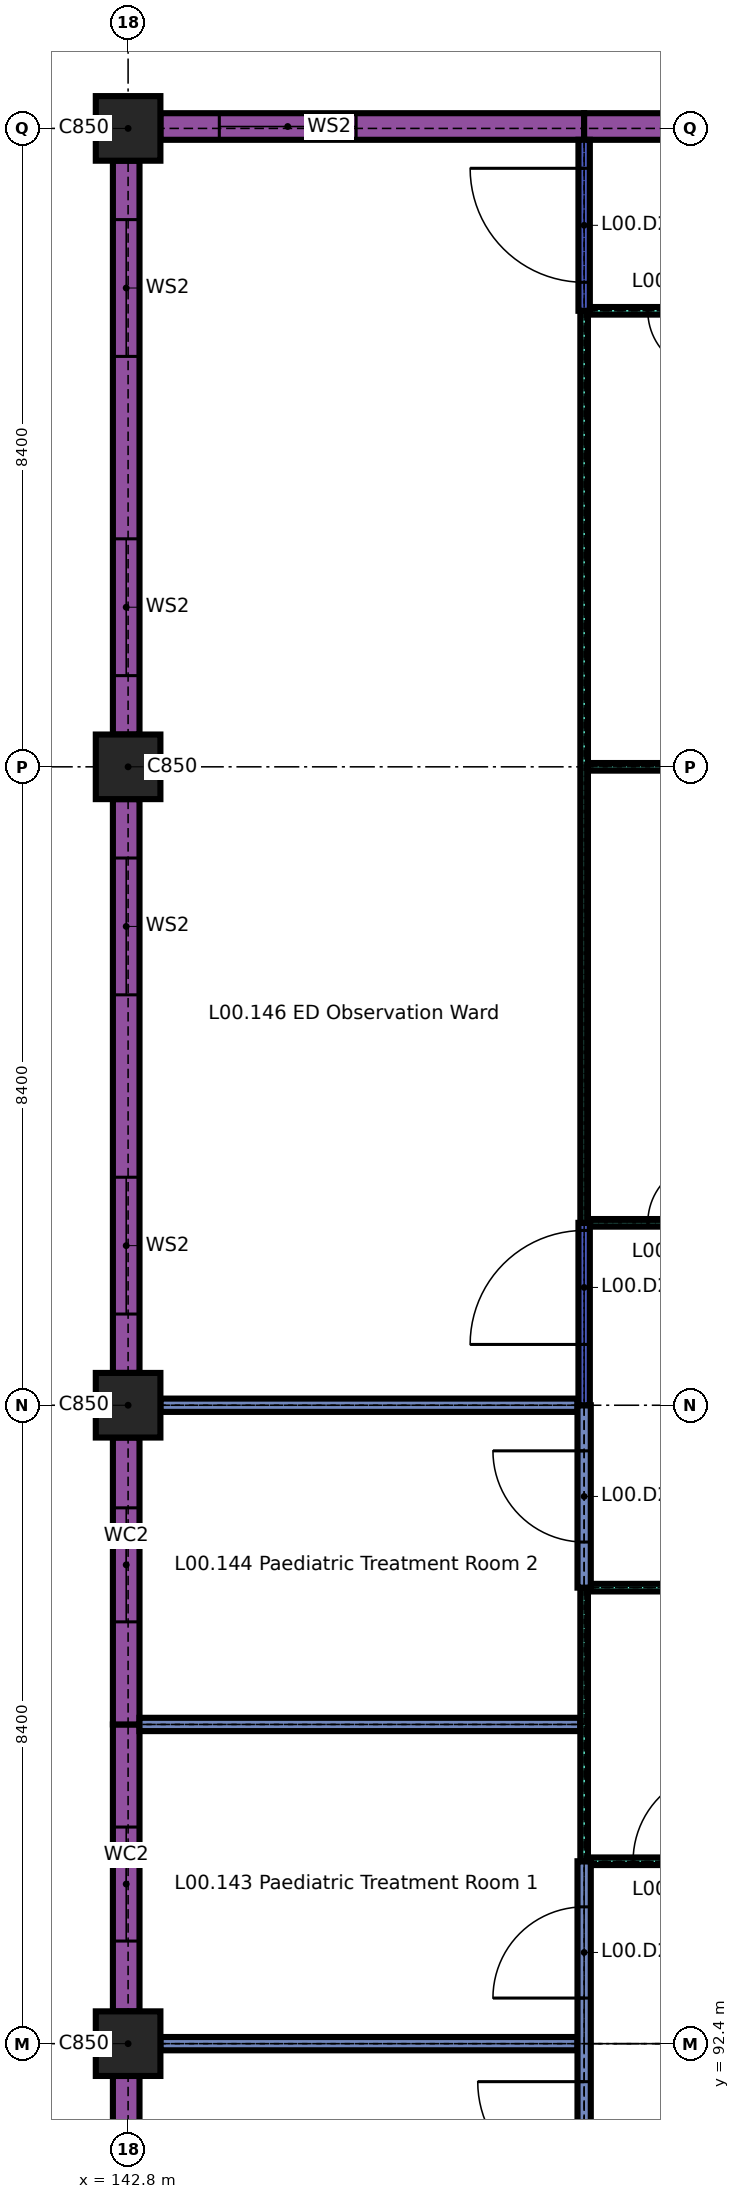
"""IFC4 building model, lengths in metres.
Left out: names, types, materials, properties, quantities, classifications, styles, units other than length and angle.
Written with IfcOpenShell. Run it as: python <this file> out.ifc"""

import sys

from ifc_helpers import new_model, si_unit, direction, frame, frame_2d, origin, origin_2d, place, context, subcontext, project, spatial, rectangle, extrude, element, fill, save


model = new_model("IFC4")
c1 = context("Model", 3, precision=1e-05, world=origin(), true_north=direction((0.0, 1.0)))
c2 = subcontext(c1, "Body", "Model", "MODEL_VIEW")
j1 = project(units=[si_unit("LENGTHUNIT", "METRE"), si_unit("PLANEANGLEUNIT", "RADIAN")], contexts=[c1])
p1 = place(None, origin())
s1 = spatial("IfcSite", under=j1, at=p1, CompositionType="ELEMENT")
p2 = place(p1, origin())
s2 = spatial("IfcBuilding", under=s1, at=p2, CompositionType="ELEMENT")
p3 = place(p2, origin())
s3 = spatial("IfcBuildingStorey", under=s2, at=p3, CompositionType="ELEMENT", Elevation=0.0)
for number, where, z_axis, x_axis in (
    (1, (142.8, 92.4, 0.0), (0.0, 0.0, 1.0), (1.0, 0.0, 0.0)),
    (2, (142.8, 100.8, 0.0), (0.0, 0.0, 1.0), (1.0, 0.0, 0.0)),
    (3, (142.8, 109.2, 0.0), (0.0, 0.0, 1.0), (1.0, 0.0, 0.0)),
    (4, (142.8, 117.6, 0.0), (0.0, 0.0, 1.0), (1.0, 0.0, 0.0)),
):
    element("IfcColumn", number, at=place(p3, frame(where, z_axis=z_axis, x_axis=x_axis)), inside=s3, PredefinedType="COLUMN", context=c2, shape_type="SweptSolid", body=[
        extrude(rectangle(XDim=0.85, YDim=0.85, at=origin_2d()), origin(), (0.0, 0.0, 1.0), 4.14),
    ])
p4 = place(p3, frame((143.225, 117.625, 0.0), z_axis=(0.0, 0.0, 1.0), x_axis=(1.0, 0.0, 0.0)))
e5 = element("IfcWall", 5, at=p4, inside=s3, PredefinedType="SOLIDWALL", context=c2, shape_type="SweptSolid", body=[
    extrude(rectangle(XDim=5.575, YDim=0.35, at=frame_2d((2.788, 0.0))), origin(), (0.0, 0.0, 1.0), 3.84),
])
p5 = place(p4, frame((0.775, 0.0, 0.9)))
e6 = element("IfcOpeningElement", 6, at=p5, cuts=e5, PredefinedType="OPENING", context=c2, shape_type="SweptSolid", body=[
    extrude(rectangle(XDim=1.8, YDim=2.1, at=frame_2d((0.9, 1.05))), frame((0.0, 0.185, 0.0), z_axis=(0.0, -1.0, 0.0), x_axis=(1.0, 0.0, 0.0)), (0.0, 0.0, 1.0), 0.37),
])
p6 = place(p3, frame((148.8, 117.625, 0.0), z_axis=(0.0, 0.0, 1.0), x_axis=(1.0, 0.0, 0.0)))
e7 = element("IfcWall", 7, at=p6, inside=s3, PredefinedType="SOLIDWALL", context=c2, shape_type="SweptSolid", body=[
    extrude(rectangle(XDim=1.975, YDim=0.35, at=frame_2d((0.987, 0.0))), origin(), (0.0, 0.0, 1.0), 3.84),
])
p7 = place(p3, frame((142.775, 88.2, 0.0), z_axis=(0.0, 0.0, 1.0), x_axis=(0.0, 1.0, 0.0)))
e8 = element("IfcWall", 8, at=p7, inside=s3, PredefinedType="SOLIDWALL", context=c2, shape_type="SweptSolid", body=[
    extrude(rectangle(XDim=3.775, YDim=0.35, at=frame_2d((1.888, 0.0))), origin(), (0.0, 0.0, 1.0), 3.84),
])
p8 = place(p7, frame((1.2, 0.0, 0.9)))
e9 = element("IfcOpeningElement", 9, at=p8, cuts=e8, PredefinedType="OPENING", context=c2, shape_type="SweptSolid", body=[
    extrude(rectangle(XDim=1.8, YDim=2.1, at=frame_2d((0.9, 1.05))), frame((0.0, 0.185, 0.0), z_axis=(0.0, -1.0, 0.0), x_axis=(1.0, 0.0, 0.0)), (0.0, 0.0, 1.0), 0.37),
])
p9 = place(p3, frame((142.775, 92.825, 0.0), z_axis=(0.0, 0.0, 1.0), x_axis=(0.0, 1.0, 0.0)))
e10 = element("IfcWall", 10, at=p9, inside=s3, PredefinedType="SOLIDWALL", context=c2, shape_type="SweptSolid", body=[
    extrude(rectangle(XDim=3.775, YDim=0.35, at=frame_2d((1.888, 0.0))), origin(), (0.0, 0.0, 1.0), 3.84),
])
p10 = place(p9, frame((0.925, 0.0, 0.9)))
e11 = element("IfcOpeningElement", 11, at=p10, cuts=e10, PredefinedType="OPENING", context=c2, shape_type="SweptSolid", body=[
    extrude(rectangle(XDim=1.5, YDim=2.1, at=frame_2d((0.75, 1.05))), frame((0.0, 0.185, 0.0), z_axis=(0.0, -1.0, 0.0), x_axis=(1.0, 0.0, 0.0)), (0.0, 0.0, 1.0), 0.37),
])
p11 = place(p3, frame((142.775, 96.6, 0.0), z_axis=(0.0, 0.0, 1.0), x_axis=(0.0, 1.0, 0.0)))
e12 = element("IfcWall", 12, at=p11, inside=s3, PredefinedType="SOLIDWALL", context=c2, shape_type="SweptSolid", body=[
    extrude(rectangle(XDim=3.775, YDim=0.35, at=frame_2d((1.887, 0.0))), origin(), (0.0, 0.0, 1.0), 3.84),
])
p12 = place(p11, frame((1.35, 0.0, 0.9)))
e13 = element("IfcOpeningElement", 13, at=p12, cuts=e12, PredefinedType="OPENING", context=c2, shape_type="SweptSolid", body=[
    extrude(rectangle(XDim=1.5, YDim=2.1, at=frame_2d((0.75, 1.05))), frame((0.0, 0.185, 0.0), z_axis=(0.0, -1.0, 0.0), x_axis=(1.0, 0.0, 0.0)), (0.0, 0.0, 1.0), 0.37),
])
p13 = place(p3, frame((142.775, 101.225, 0.0), z_axis=(0.0, 0.0, 1.0), x_axis=(0.0, 1.0, 0.0)))
e14 = element("IfcWall", 14, at=p13, inside=s3, PredefinedType="SOLIDWALL", context=c2, shape_type="SweptSolid", body=[
    extrude(rectangle(XDim=7.55, YDim=0.35, at=frame_2d((3.775, 0.0))), origin(), (0.0, 0.0, 1.0), 3.84),
])
p14 = place(p13, frame((0.775, 0.0, 0.9)))
e15 = element("IfcOpeningElement", 15, at=p14, cuts=e14, PredefinedType="OPENING", context=c2, shape_type="SweptSolid", body=[
    extrude(rectangle(XDim=1.8, YDim=2.1, at=frame_2d((0.9, 1.05))), frame((0.0, 0.185, 0.0), z_axis=(0.0, -1.0, 0.0), x_axis=(1.0, 0.0, 0.0)), (0.0, 0.0, 1.0), 0.37),
])
p15 = place(p13, frame((4.975, 0.0, 0.9)))
e16 = element("IfcOpeningElement", 16, at=p15, cuts=e14, PredefinedType="OPENING", context=c2, shape_type="SweptSolid", body=[
    extrude(rectangle(XDim=1.8, YDim=2.1, at=frame_2d((0.9, 1.05))), frame((0.0, 0.185, 0.0), z_axis=(0.0, -1.0, 0.0), x_axis=(1.0, 0.0, 0.0)), (0.0, 0.0, 1.0), 0.37),
])
p16 = place(p3, frame((142.775, 109.625, 0.0), z_axis=(0.0, 0.0, 1.0), x_axis=(0.0, 1.0, 0.0)))
e17 = element("IfcWall", 17, at=p16, inside=s3, PredefinedType="SOLIDWALL", context=c2, shape_type="SweptSolid", body=[
    extrude(rectangle(XDim=7.55, YDim=0.35, at=frame_2d((3.775, 0.0))), origin(), (0.0, 0.0, 1.0), 3.84),
])
p17 = place(p16, frame((0.775, 0.0, 0.9)))
e18 = element("IfcOpeningElement", 18, at=p17, cuts=e17, PredefinedType="OPENING", context=c2, shape_type="SweptSolid", body=[
    extrude(rectangle(XDim=1.8, YDim=2.1, at=frame_2d((0.9, 1.05))), frame((0.0, 0.185, 0.0), z_axis=(0.0, -1.0, 0.0), x_axis=(1.0, 0.0, 0.0)), (0.0, 0.0, 1.0), 0.37),
])
p18 = place(p16, frame((4.975, 0.0, 0.9)))
e19 = element("IfcOpeningElement", 19, at=p18, cuts=e17, PredefinedType="OPENING", context=c2, shape_type="SweptSolid", body=[
    extrude(rectangle(XDim=1.8, YDim=2.1, at=frame_2d((0.9, 1.05))), frame((0.0, 0.185, 0.0), z_axis=(0.0, -1.0, 0.0), x_axis=(1.0, 0.0, 0.0)), (0.0, 0.0, 1.0), 0.37),
])
p19 = place(p3, frame((143.225, 92.4, 0.0), z_axis=(0.0, 0.0, 1.0), x_axis=(1.0, 0.0, 0.0)))
e20 = element("IfcWall", 20, at=p19, inside=s3, PredefinedType="PARTITIONING", context=c2, shape_type="SweptSolid", body=[
    extrude(rectangle(XDim=5.487, YDim=0.175, at=frame_2d((2.744, 0.0))), origin(), (0.0, 0.0, 1.0), 4.14),
])
p20 = place(p3, frame((148.887, 94.8, 0.0), z_axis=(0.0, 0.0, 1.0), x_axis=(1.0, 0.0, 0.0)))
e21 = element("IfcWall", 21, at=p20, inside=s3, PredefinedType="PARTITIONING", context=c2, shape_type="SweptSolid", body=[
    extrude(rectangle(XDim=2.363, YDim=0.1, at=frame_2d((1.181, 0.0))), origin(), (0.0, 0.0, 1.0), 4.14),
])
p21 = place(p20, frame((0.556, 0.0, 0.0)))
e22 = element("IfcOpeningElement", 22, at=p21, cuts=e21, PredefinedType="OPENING", context=c2, shape_type="SweptSolid", body=[
    extrude(rectangle(XDim=1.2, YDim=2.1, at=frame_2d((0.6, 1.05))), frame((0.0, 0.06, 0.0), z_axis=(0.0, -1.0, 0.0), x_axis=(1.0, 0.0, 0.0)), (0.0, 0.0, 1.0), 0.12),
])
p22 = place(p3, frame((142.95, 96.6, 0.0), z_axis=(0.0, 0.0, 1.0), x_axis=(1.0, 0.0, 0.0)))
e23 = element("IfcWall", 23, at=p22, inside=s3, PredefinedType="PARTITIONING", context=c2, shape_type="SweptSolid", body=[
    extrude(rectangle(XDim=5.8, YDim=0.175, at=frame_2d((2.9, 0.0))), origin(), (0.0, 0.0, 1.0), 4.14),
])
p23 = place(p3, frame((148.887, 98.4, 0.0), z_axis=(0.0, 0.0, 1.0), x_axis=(1.0, 0.0, 0.0)))
e24 = element("IfcWall", 24, at=p23, inside=s3, PredefinedType="PARTITIONING", context=c2, shape_type="SweptSolid", body=[
    extrude(rectangle(XDim=2.363, YDim=0.1, at=frame_2d((1.181, 0.0))), origin(), (0.0, 0.0, 1.0), 4.14),
])
p24 = place(p3, frame((143.225, 100.8, 0.0), z_axis=(0.0, 0.0, 1.0), x_axis=(1.0, 0.0, 0.0)))
e25 = element("IfcWall", 25, at=p24, inside=s3, PredefinedType="PARTITIONING", context=c2, shape_type="SweptSolid", body=[
    extrude(rectangle(XDim=5.487, YDim=0.175, at=frame_2d((2.744, 0.0))), origin(), (0.0, 0.0, 1.0), 4.14),
])
p25 = place(p3, frame((148.875, 103.2, 0.0), z_axis=(0.0, 0.0, 1.0), x_axis=(1.0, 0.0, 0.0)))
e26 = element("IfcWall", 26, at=p25, inside=s3, PredefinedType="PARTITIONING", context=c2, shape_type="SweptSolid", body=[
    extrude(rectangle(XDim=2.375, YDim=0.1, at=frame_2d((1.188, 0.0))), origin(), (0.0, 0.0, 1.0), 4.14),
])
p26 = place(p25, frame((0.762, 0.0, 0.0)))
e27 = element("IfcOpeningElement", 27, at=p26, cuts=e26, PredefinedType="OPENING", context=c2, shape_type="SweptSolid", body=[
    extrude(rectangle(XDim=0.8, YDim=2.1, at=frame_2d((0.4, 1.05))), frame((0.0, 0.06, 0.0), z_axis=(0.0, -1.0, 0.0), x_axis=(1.0, 0.0, 0.0)), (0.0, 0.0, 1.0), 0.12),
])
p27 = place(p3, frame((148.85, 109.2, 0.0), z_axis=(0.0, 0.0, 1.0), x_axis=(1.0, 0.0, 0.0)))
e28 = element("IfcWall", 28, at=p27, inside=s3, PredefinedType="PARTITIONING", context=c2, shape_type="SweptSolid", body=[
    extrude(rectangle(XDim=1.925, YDim=0.1, at=frame_2d((0.962, 0.0))), origin(), (0.0, 0.0, 1.0), 4.14),
])
p28 = place(p3, frame((148.875, 115.2, 0.0), z_axis=(0.0, 0.0, 1.0), x_axis=(1.0, 0.0, 0.0)))
e29 = element("IfcWall", 29, at=p28, inside=s3, PredefinedType="PARTITIONING", context=c2, shape_type="SweptSolid", body=[
    extrude(rectangle(XDim=2.375, YDim=0.1, at=frame_2d((1.188, 0.0))), origin(), (0.0, 0.0, 1.0), 4.14),
])
p29 = place(p28, frame((0.762, 0.0, 0.0)))
e30 = element("IfcOpeningElement", 30, at=p29, cuts=e29, PredefinedType="OPENING", context=c2, shape_type="SweptSolid", body=[
    extrude(rectangle(XDim=0.8, YDim=2.1, at=frame_2d((0.4, 1.05))), frame((0.0, 0.06, 0.0), z_axis=(0.0, -1.0, 0.0), x_axis=(1.0, 0.0, 0.0)), (0.0, 0.0, 1.0), 0.12),
])
p30 = place(p3, frame((148.8, 90.0, 0.0), z_axis=(0.0, 0.0, 1.0), x_axis=(0.0, 1.0, 0.0)))
e31 = element("IfcWall", 31, at=p30, inside=s3, PredefinedType="PARTITIONING", context=c2, shape_type="SweptSolid", body=[
    extrude(rectangle(XDim=4.8, YDim=0.175, at=frame_2d((2.4, 0.0))), origin(), (0.0, 0.0, 1.0), 4.14),
])
p31 = place(p30, frame((0.5, 0.0, 0.0)))
e32 = element("IfcOpeningElement", 32, at=p31, cuts=e31, PredefinedType="OPENING", context=c2, shape_type="SweptSolid", body=[
    extrude(rectangle(XDim=1.4, YDim=2.1, at=frame_2d((0.7, 1.05))), frame((0.0, 0.097, 0.0), z_axis=(0.0, -1.0, 0.0), x_axis=(1.0, 0.0, 0.0)), (0.0, 0.0, 1.0), 0.195),
])
p32 = place(p30, frame((3.0, 0.0, 0.0)))
e33 = element("IfcOpeningElement", 33, at=p32, cuts=e31, PredefinedType="OPENING", context=c2, shape_type="SweptSolid", body=[
    extrude(rectangle(XDim=1.2, YDim=2.1, at=frame_2d((0.6, 1.05))), frame((0.0, 0.097, 0.0), z_axis=(0.0, -1.0, 0.0), x_axis=(1.0, 0.0, 0.0)), (0.0, 0.0, 1.0), 0.195),
])
p33 = place(p3, frame((148.8, 94.8, 0.0), z_axis=(0.0, 0.0, 1.0), x_axis=(0.0, 1.0, 0.0)))
e34 = element("IfcWall", 34, at=p33, inside=s3, PredefinedType="PARTITIONING", context=c2, shape_type="SweptSolid", body=[
    extrude(rectangle(XDim=3.6, YDim=0.1, at=frame_2d((1.8, 0.0))), origin(), (0.0, 0.0, 1.0), 4.14),
])
p34 = place(p3, frame((148.8, 98.4, 0.0), z_axis=(0.0, 0.0, 1.0), x_axis=(0.0, 1.0, 0.0)))
e35 = element("IfcWall", 35, at=p34, inside=s3, PredefinedType="PARTITIONING", context=c2, shape_type="SweptSolid", body=[
    extrude(rectangle(XDim=2.4, YDim=0.175, at=frame_2d((1.2, 0.0))), origin(), (0.0, 0.0, 1.0), 4.14),
])
p35 = place(p34, frame((0.6, 0.0, 0.0)))
e36 = element("IfcOpeningElement", 36, at=p35, cuts=e35, PredefinedType="OPENING", context=c2, shape_type="SweptSolid", body=[
    extrude(rectangle(XDim=1.2, YDim=2.1, at=frame_2d((0.6, 1.05))), frame((0.0, 0.097, 0.0), z_axis=(0.0, -1.0, 0.0), x_axis=(1.0, 0.0, 0.0)), (0.0, 0.0, 1.0), 0.195),
])
p36 = place(p3, frame((148.8, 100.8, 0.0), z_axis=(0.0, 0.0, 1.0), x_axis=(0.0, 1.0, 0.0)))
e37 = element("IfcWall", 37, at=p36, inside=s3, PredefinedType="PARTITIONING", context=c2, shape_type="SweptSolid", body=[
    extrude(rectangle(XDim=2.4, YDim=0.15, at=frame_2d((1.2, 0.0))), origin(), (0.0, 0.0, 1.0), 4.14),
])
p37 = place(p36, frame((0.8, 0.0, 0.0)))
e38 = element("IfcOpeningElement", 38, at=p37, cuts=e37, PredefinedType="OPENING", context=c2, shape_type="SweptSolid", body=[
    extrude(rectangle(XDim=1.5, YDim=2.4, at=frame_2d((0.75, 1.2))), frame((0.0, 0.085, 0.0), z_axis=(0.0, -1.0, 0.0), x_axis=(1.0, 0.0, 0.0)), (0.0, 0.0, 1.0), 0.17),
])
p38 = place(p3, frame((148.8, 103.2, 0.0), z_axis=(0.0, 0.0, 1.0), x_axis=(0.0, 1.0, 0.0)))
e39 = element("IfcWall", 39, at=p38, inside=s3, PredefinedType="PARTITIONING", context=c2, shape_type="SweptSolid", body=[
    extrude(rectangle(XDim=12.0, YDim=0.1, at=frame_2d((6.0, 0.0))), origin(), (0.0, 0.0, 1.0), 4.14),
])
p39 = place(p3, frame((148.8, 115.2, 0.0), z_axis=(0.0, 0.0, 1.0), x_axis=(0.0, 1.0, 0.0)))
e40 = element("IfcWall", 40, at=p39, inside=s3, PredefinedType="PARTITIONING", context=c2, shape_type="SweptSolid", body=[
    extrude(rectangle(XDim=2.25, YDim=0.15, at=frame_2d((1.125, 0.0))), origin(), (0.0, 0.0, 1.0), 4.14),
])
p40 = place(p39, frame((0.375, 0.0, 0.0)))
e41 = element("IfcOpeningElement", 41, at=p40, cuts=e40, PredefinedType="OPENING", context=c2, shape_type="SweptSolid", body=[
    extrude(rectangle(XDim=1.5, YDim=2.4, at=frame_2d((0.75, 1.2))), frame((0.0, 0.085, 0.0), z_axis=(0.0, -1.0, 0.0), x_axis=(1.0, 0.0, 0.0)), (0.0, 0.0, 1.0), 0.17),
])
p41 = place(p5, origin())
e42 = element("IfcWindow", 42, at=p41, inside=s3, PartitioningType="SINGLE_PANEL", PredefinedType="WINDOW", context=c2, shape_type="SweptSolid", body=[
    extrude(rectangle(XDim=1.8, YDim=2.1, at=frame_2d((0.9, 1.05))), frame((0.0, 0.045, 0.0), z_axis=(0.0, -1.0, 0.0), x_axis=(1.0, 0.0, 0.0)), (0.0, 0.0, 1.0), 0.09),
])
fill(e6, e42)
p42 = place(p10, origin())
e43 = element("IfcWindow", 43, at=p42, inside=s3, PartitioningType="SINGLE_PANEL", PredefinedType="WINDOW", context=c2, shape_type="SweptSolid", body=[
    extrude(rectangle(XDim=1.5, YDim=2.1, at=frame_2d((0.75, 1.05))), frame((0.0, 0.03, 0.0), z_axis=(0.0, -1.0, 0.0), x_axis=(1.0, 0.0, 0.0)), (0.0, 0.0, 1.0), 0.06),
])
fill(e11, e43)
p43 = place(p12, origin())
e44 = element("IfcWindow", 44, at=p43, inside=s3, PartitioningType="SINGLE_PANEL", PredefinedType="WINDOW", context=c2, shape_type="SweptSolid", body=[
    extrude(rectangle(XDim=1.5, YDim=2.1, at=frame_2d((0.75, 1.05))), frame((0.0, 0.03, 0.0), z_axis=(0.0, -1.0, 0.0), x_axis=(1.0, 0.0, 0.0)), (0.0, 0.0, 1.0), 0.06),
])
fill(e13, e44)
p44 = place(p14, origin())
e45 = element("IfcWindow", 45, at=p44, inside=s3, PartitioningType="SINGLE_PANEL", PredefinedType="WINDOW", context=c2, shape_type="SweptSolid", body=[
    extrude(rectangle(XDim=1.8, YDim=2.1, at=frame_2d((0.9, 1.05))), frame((0.0, 0.045, 0.0), z_axis=(0.0, -1.0, 0.0), x_axis=(1.0, 0.0, 0.0)), (0.0, 0.0, 1.0), 0.09),
])
fill(e15, e45)
p45 = place(p15, origin())
e46 = element("IfcWindow", 46, at=p45, inside=s3, PartitioningType="SINGLE_PANEL", PredefinedType="WINDOW", context=c2, shape_type="SweptSolid", body=[
    extrude(rectangle(XDim=1.8, YDim=2.1, at=frame_2d((0.9, 1.05))), frame((0.0, 0.045, 0.0), z_axis=(0.0, -1.0, 0.0), x_axis=(1.0, 0.0, 0.0)), (0.0, 0.0, 1.0), 0.09),
])
fill(e16, e46)
p46 = place(p17, origin())
e47 = element("IfcWindow", 47, at=p46, inside=s3, PartitioningType="SINGLE_PANEL", PredefinedType="WINDOW", context=c2, shape_type="SweptSolid", body=[
    extrude(rectangle(XDim=1.8, YDim=2.1, at=frame_2d((0.9, 1.05))), frame((0.0, 0.045, 0.0), z_axis=(0.0, -1.0, 0.0), x_axis=(1.0, 0.0, 0.0)), (0.0, 0.0, 1.0), 0.09),
])
fill(e18, e47)
p47 = place(p18, origin())
e48 = element("IfcWindow", 48, at=p47, inside=s3, PartitioningType="SINGLE_PANEL", PredefinedType="WINDOW", context=c2, shape_type="SweptSolid", body=[
    extrude(rectangle(XDim=1.8, YDim=2.1, at=frame_2d((0.9, 1.05))), frame((0.0, 0.045, 0.0), z_axis=(0.0, -1.0, 0.0), x_axis=(1.0, 0.0, 0.0)), (0.0, 0.0, 1.0), 0.09),
])
fill(e19, e48)
p48 = place(p21, origin())
e49 = element("IfcDoor", 49, at=p48, inside=s3, OperationType="SINGLE_SWING_LEFT", PredefinedType="DOOR", context=c2, shape_type="SweptSolid", body=[
    extrude(rectangle(XDim=1.2, YDim=2.1, at=frame_2d((0.6, 1.05))), frame((0.0, 0.02, 0.0), z_axis=(0.0, -1.0, 0.0), x_axis=(1.0, 0.0, 0.0)), (0.0, 0.0, 1.0), 0.04),
])
fill(e22, e49)
p49 = place(p26, origin())
e50 = element("IfcDoor", 50, at=p49, inside=s3, OperationType="SINGLE_SWING_LEFT", PredefinedType="DOOR", context=c2, shape_type="SweptSolid", body=[
    extrude(rectangle(XDim=0.8, YDim=2.1, at=frame_2d((0.4, 1.05))), frame((0.0, 0.02, 0.0), z_axis=(0.0, -1.0, 0.0), x_axis=(1.0, 0.0, 0.0)), (0.0, 0.0, 1.0), 0.04),
])
fill(e27, e50)
p50 = place(p29, origin())
e51 = element("IfcDoor", 51, at=p50, inside=s3, OperationType="SINGLE_SWING_RIGHT", PredefinedType="DOOR", context=c2, shape_type="SweptSolid", body=[
    extrude(rectangle(XDim=0.8, YDim=2.1, at=frame_2d((0.4, 1.05))), frame((0.0, 0.02, 0.0), z_axis=(0.0, -1.0, 0.0), x_axis=(1.0, 0.0, 0.0)), (0.0, 0.0, 1.0), 0.04),
])
fill(e30, e51)
p51 = place(p31, origin())
e52 = element("IfcDoor", 52, at=p51, inside=s3, OperationType="SINGLE_SWING_LEFT", PredefinedType="DOOR", context=c2, shape_type="SweptSolid", body=[
    extrude(rectangle(XDim=1.4, YDim=2.1, at=frame_2d((0.7, 1.05))), frame((0.0, 0.025, 0.0), z_axis=(0.0, -1.0, 0.0), x_axis=(1.0, 0.0, 0.0)), (0.0, 0.0, 1.0), 0.05),
])
fill(e32, e52)
p52 = place(p32, origin())
e53 = element("IfcDoor", 53, at=p52, inside=s3, OperationType="SINGLE_SWING_RIGHT", PredefinedType="DOOR", context=c2, shape_type="SweptSolid", body=[
    extrude(rectangle(XDim=1.2, YDim=2.1, at=frame_2d((0.6, 1.05))), frame((0.0, 0.035, 0.0), z_axis=(0.0, -1.0, 0.0), x_axis=(1.0, 0.0, 0.0)), (0.0, 0.0, 1.0), 0.07),
])
fill(e33, e53)
p53 = place(p35, origin())
e54 = element("IfcDoor", 54, at=p53, inside=s3, OperationType="SINGLE_SWING_LEFT", PredefinedType="DOOR", context=c2, shape_type="SweptSolid", body=[
    extrude(rectangle(XDim=1.2, YDim=2.1, at=frame_2d((0.6, 1.05))), frame((0.0, 0.035, 0.0), z_axis=(0.0, -1.0, 0.0), x_axis=(1.0, 0.0, 0.0)), (0.0, 0.0, 1.0), 0.07),
])
fill(e36, e54)
p54 = place(p37, origin())
e55 = element("IfcDoor", 55, at=p54, inside=s3, OperationType="SINGLE_SWING_RIGHT", PredefinedType="DOOR", context=c2, shape_type="SweptSolid", body=[
    extrude(rectangle(XDim=1.5, YDim=2.4, at=frame_2d((0.75, 1.2))), frame((0.0, 0.03, 0.0), z_axis=(0.0, -1.0, 0.0), x_axis=(1.0, 0.0, 0.0)), (0.0, 0.0, 1.0), 0.06),
])
fill(e38, e55)
p55 = place(p40, origin())
e56 = element("IfcDoor", 56, at=p55, inside=s3, OperationType="SINGLE_SWING_LEFT", PredefinedType="DOOR", context=c2, shape_type="SweptSolid", body=[
    extrude(rectangle(XDim=1.5, YDim=2.4, at=frame_2d((0.75, 1.2))), frame((0.0, 0.03, 0.0), z_axis=(0.0, -1.0, 0.0), x_axis=(1.0, 0.0, 0.0)), (0.0, 0.0, 1.0), 0.06),
])
fill(e41, e56)
save(model, sys.argv[1])
